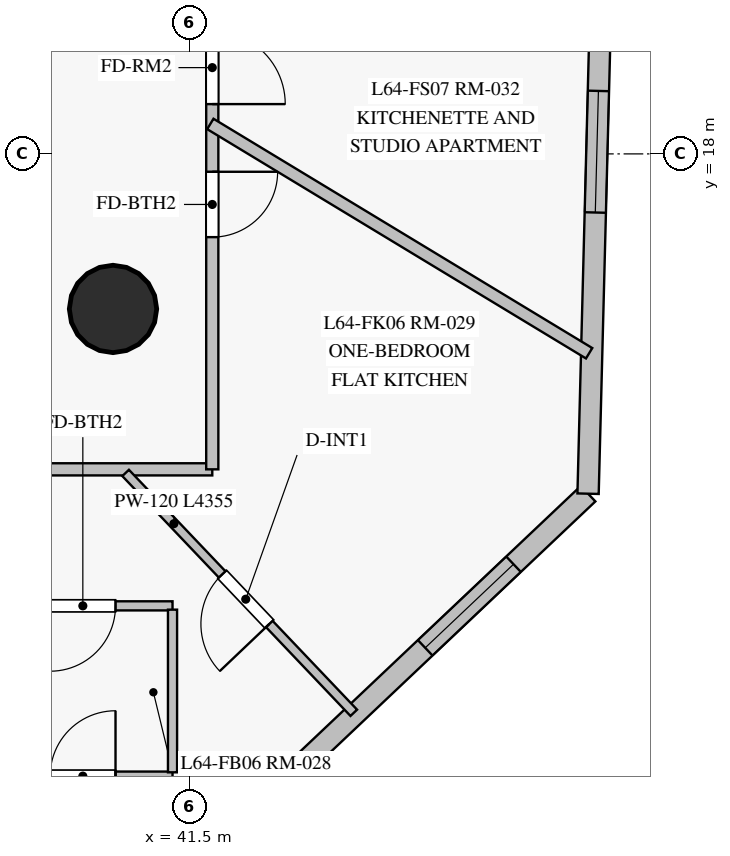
"""IFC4 building model, lengths in metres.
Left out: names, types, materials, properties, quantities, classifications, styles, units other than length and angle.
Written with IfcOpenShell. Run it as: python <this file> out.ifc"""

import sys

from ifc_helpers import new_model, si_unit, direction, frame, frame_2d, origin, origin_with_axes, origin_2d, place, context, subcontext, project, spatial, rectangle, circle, extrude, source, transform, mapped, element, fill, save


model = new_model("IFC4")
c1 = context("Model", 3, precision=1e-05, world=origin(), true_north=direction((0.0, 1.0)))
c2 = subcontext(c1, "Body", "Model", "MODEL_VIEW")
j1 = project(units=[si_unit("LENGTHUNIT", "METRE"), si_unit("PLANEANGLEUNIT", "RADIAN")], contexts=[c1])
p1 = place(None, origin())
s1 = spatial("IfcSite", under=j1, at=p1, CompositionType="ELEMENT")
p2 = place(p1, origin())
s2 = spatial("IfcBuilding", under=s1, at=p2, CompositionType="ELEMENT")
p3 = place(p2, frame((0.0, 0.0, 219.95)))
s3 = spatial("IfcBuildingStorey", under=s2, at=p3, CompositionType="ELEMENT", Elevation=219.95)
m1 = source(origin_with_axes(), c2, "Body", "SweptSolid", [
    extrude(circle(Radius=0.575, at=origin_2d()), origin(), (0.0, 0.0, 1.0), 3.05),
])
p4 = place(p3, frame((40.494, 15.96, 0.0), z_axis=(0.0, 0.0, 1.0), x_axis=(1.0, 0.0, 0.0)))
e1 = element("IfcColumn", 1, at=p4, inside=s3, PredefinedType="COLUMN", context=c2, shape_type="MappedRepresentation", body=[
    mapped(m1, transform((0.0, 0.0, 0.0), scale=1.0)),
])
p5 = place(p3, frame((39.758, 6.918, 0.0), z_axis=(0.0, 0.0, 1.0), x_axis=(0.726306750321, 0.687370718345, 0.0)))
e2 = element("IfcWall", 2, at=p5, inside=s3, PredefinedType="SOLIDWALL", context=c2, shape_type="SweptSolid", body=[
    extrude(rectangle(XDim=9.619, YDim=0.28, at=frame_2d((4.809, 0.0))), origin(), (0.0, 0.0, 1.0), 2.85),
])
p6 = place(p5, frame((1.939, 0.0, 0.85)))
e3 = element("IfcOpeningElement", 3, at=p6, cuts=e2, PredefinedType="OPENING", context=c2, shape_type="SweptSolid", body=[
    extrude(rectangle(XDim=1.6, YDim=1.6, at=frame_2d((0.8, 0.8))), frame((0.0, 0.15, 0.0), z_axis=(0.0, -1.0, 0.0), x_axis=(1.0, 0.0, 0.0)), (0.0, 0.0, 1.0), 0.3),
])
p7 = place(p5, frame((6.669, 0.0, 0.85)))
e4 = element("IfcOpeningElement", 4, at=p7, cuts=e2, PredefinedType="OPENING", context=c2, shape_type="SweptSolid", body=[
    extrude(rectangle(XDim=1.6, YDim=1.6, at=frame_2d((0.8, 0.8))), frame((0.0, 0.15, 0.0), z_axis=(0.0, -1.0, 0.0), x_axis=(1.0, 0.0, 0.0)), (0.0, 0.0, 1.0), 0.3),
])
p8 = place(p3, frame((46.744, 13.53, 0.0), z_axis=(0.0, 0.0, 1.0), x_axis=(0.025686260169, 0.999670053587, 0.0)))
e5 = element("IfcWall", 5, at=p8, inside=s3, PredefinedType="SOLIDWALL", context=c2, shape_type="SweptSolid", body=[
    extrude(rectangle(XDim=12.708, YDim=0.28, at=frame_2d((6.354, 0.0))), origin(), (0.0, 0.0, 1.0), 2.85),
])
p9 = place(p8, frame((3.7, 0.0, 0.85)))
e6 = element("IfcOpeningElement", 6, at=p9, cuts=e5, PredefinedType="OPENING", context=c2, shape_type="SweptSolid", body=[
    extrude(rectangle(XDim=1.6, YDim=1.6, at=frame_2d((0.8, 0.8))), frame((0.0, 0.15, 0.0), z_axis=(0.0, -1.0, 0.0), x_axis=(1.0, 0.0, 0.0)), (0.0, 0.0, 1.0), 0.3),
])
p10 = place(p8, frame((8.332, 0.0, 0.85)))
e7 = element("IfcOpeningElement", 7, at=p10, cuts=e5, PredefinedType="OPENING", context=c2, shape_type="SweptSolid", body=[
    extrude(rectangle(XDim=1.6, YDim=1.6, at=frame_2d((0.8, 0.8))), frame((0.0, 0.15, 0.0), z_axis=(0.0, -1.0, 0.0), x_axis=(1.0, 0.0, 0.0)), (0.0, 0.0, 1.0), 0.3),
])
p11 = place(p3, frame((41.8, 13.85, 0.0), z_axis=(0.0, 0.0, 1.0), x_axis=(-1.0, 0.0, 0.0)))
e8 = element("IfcWall", 8, at=p11, inside=s3, PredefinedType="PARTITIONING", context=c2, shape_type="SweptSolid", body=[
    extrude(rectangle(XDim=25.05, YDim=0.16, at=frame_2d((12.525, 0.0))), origin(), (0.0, 0.0, 1.0), 2.3),
])
p12 = place(p11, frame((22.03, 0.0, 0.0)))
e9 = element("IfcOpeningElement", 9, at=p12, cuts=e8, PredefinedType="OPENING", context=c2, shape_type="SweptSolid", body=[
    extrude(rectangle(XDim=0.96, YDim=2.15, at=frame_2d((0.48, 1.075))), frame((0.0, 0.09, 0.0), z_axis=(0.0, -1.0, 0.0), x_axis=(1.0, 0.0, 0.0)), (0.0, 0.0, 1.0), 0.18),
])
p13 = place(p11, frame((15.808, 0.0, 0.0)))
e10 = element("IfcOpeningElement", 10, at=p13, cuts=e8, PredefinedType="OPENING", context=c2, shape_type="SweptSolid", body=[
    extrude(rectangle(XDim=0.96, YDim=2.15, at=frame_2d((0.48, 1.075))), frame((0.0, 0.09, 0.0), z_axis=(0.0, -1.0, 0.0), x_axis=(1.0, 0.0, 0.0)), (0.0, 0.0, 1.0), 0.18),
])
p14 = place(p11, frame((12.05, 0.0, 0.0)))
e11 = element("IfcOpeningElement", 11, at=p14, cuts=e8, PredefinedType="OPENING", context=c2, shape_type="SweptSolid", body=[
    extrude(rectangle(XDim=0.96, YDim=2.15, at=frame_2d((0.48, 1.075))), frame((0.0, 0.09, 0.0), z_axis=(0.0, -1.0, 0.0), x_axis=(1.0, 0.0, 0.0)), (0.0, 0.0, 1.0), 0.18),
])
p15 = place(p11, frame((8.292, 0.0, 0.0)))
e12 = element("IfcOpeningElement", 12, at=p15, cuts=e8, PredefinedType="OPENING", context=c2, shape_type="SweptSolid", body=[
    extrude(rectangle(XDim=0.96, YDim=2.15, at=frame_2d((0.48, 1.075))), frame((0.0, 0.09, 0.0), z_axis=(0.0, -1.0, 0.0), x_axis=(1.0, 0.0, 0.0)), (0.0, 0.0, 1.0), 0.18),
])
p16 = place(p11, frame((3.184, 0.0, 0.0)))
e13 = element("IfcOpeningElement", 13, at=p16, cuts=e8, PredefinedType="OPENING", context=c2, shape_type="SweptSolid", body=[
    extrude(rectangle(XDim=0.86, YDim=2.04, at=frame_2d((0.43, 1.02))), frame((0.0, 0.09, 0.0), z_axis=(0.0, -1.0, 0.0), x_axis=(1.0, 0.0, 0.0)), (0.0, 0.0, 1.0), 0.18),
])
p17 = place(p3, frame((41.8, 33.45, 0.0), z_axis=(0.0, 0.0, 1.0), x_axis=(0.0, -1.0, 0.0)))
e14 = element("IfcWall", 14, at=p17, inside=s3, PredefinedType="PARTITIONING", context=c2, shape_type="SweptSolid", body=[
    extrude(rectangle(XDim=19.6, YDim=0.16, at=frame_2d((9.8, 0.0))), origin(), (0.0, 0.0, 1.0), 2.3),
])
p18 = place(p17, frame((13.835, 0.0, 0.0)))
e15 = element("IfcOpeningElement", 15, at=p18, cuts=e14, PredefinedType="OPENING", context=c2, shape_type="SweptSolid", body=[
    extrude(rectangle(XDim=0.96, YDim=2.15, at=frame_2d((0.48, 1.075))), frame((0.0, 0.09, 0.0), z_axis=(0.0, -1.0, 0.0), x_axis=(1.0, 0.0, 0.0)), (0.0, 0.0, 1.0), 0.18),
])
p19 = place(p17, frame((10.934, 0.0, 0.0)))
e16 = element("IfcOpeningElement", 16, at=p19, cuts=e14, PredefinedType="OPENING", context=c2, shape_type="SweptSolid", body=[
    extrude(rectangle(XDim=0.96, YDim=2.15, at=frame_2d((0.48, 1.075))), frame((0.0, 0.09, 0.0), z_axis=(0.0, -1.0, 0.0), x_axis=(1.0, 0.0, 0.0)), (0.0, 0.0, 1.0), 0.18),
])
p20 = place(p17, frame((3.701, 0.0, 0.0)))
e17 = element("IfcOpeningElement", 17, at=p20, cuts=e14, PredefinedType="OPENING", context=c2, shape_type="SweptSolid", body=[
    extrude(rectangle(XDim=0.96, YDim=2.15, at=frame_2d((0.48, 1.075))), frame((0.0, 0.09, 0.0), z_axis=(0.0, -1.0, 0.0), x_axis=(1.0, 0.0, 0.0)), (0.0, 0.0, 1.0), 0.18),
])
p21 = place(p17, frame((15.685, 0.0, 0.0)))
e18 = element("IfcOpeningElement", 18, at=p21, cuts=e14, PredefinedType="OPENING", context=c2, shape_type="SweptSolid", body=[
    extrude(rectangle(XDim=0.86, YDim=2.04, at=frame_2d((0.43, 1.02))), frame((0.0, 0.09, 0.0), z_axis=(0.0, -1.0, 0.0), x_axis=(1.0, 0.0, 0.0)), (0.0, 0.0, 1.0), 0.18),
])
p22 = place(p3, frame((35.659, 13.876, 0.0), z_axis=(0.0, 0.0, 1.0), x_axis=(0.496904293202, -0.867805348795, 0.0)))
e19 = element("IfcWall", 19, at=p22, inside=s3, PredefinedType="PARTITIONING", context=c2, shape_type="SweptSolid", body=[
    extrude(rectangle(XDim=8.002, YDim=0.16, at=frame_2d((4.001, 0.0))), origin(), (0.0, 0.0, 1.0), 2.85),
])
p23 = place(p3, frame((41.774, 18.394, 0.0), z_axis=(0.0, 0.0, 1.0), x_axis=(0.855456106039, -0.517875323453, 0.0)))
e20 = element("IfcWall", 20, at=p23, inside=s3, PredefinedType="PARTITIONING", context=c2, shape_type="SweptSolid", body=[
    extrude(rectangle(XDim=5.825, YDim=0.16, at=frame_2d((2.913, 0.0))), origin(), (0.0, 0.0, 1.0), 2.85),
])
p24 = place(p3, frame((43.662, 10.647, 0.0), z_axis=(0.0, 0.0, 1.0), x_axis=(-0.689200128432, 0.724571033763, 0.0)))
e21 = element("IfcWall", 21, at=p24, inside=s3, PredefinedType="PARTITIONING", context=c2, shape_type="SweptSolid", body=[
    extrude(rectangle(XDim=4.355, YDim=0.12, at=frame_2d((2.178, 0.0))), origin(), (0.0, 0.0, 1.0), 2.85),
])
p25 = place(p24, frame((1.613, 0.0, 0.0)))
e22 = element("IfcOpeningElement", 22, at=p25, cuts=e21, PredefinedType="OPENING", context=c2, shape_type="SweptSolid", body=[
    extrude(rectangle(XDim=0.9, YDim=2.1, at=frame_2d((0.45, 1.05))), frame((0.0, 0.07, 0.0), z_axis=(0.0, -1.0, 0.0), x_axis=(1.0, 0.0, 0.0)), (0.0, 0.0, 1.0), 0.14),
])
p26 = place(p3, frame((38.917, 9.814, 0.0), z_axis=(0.0, 0.0, 1.0), x_axis=(1.0, 0.0, 0.0)))
e23 = element("IfcWall", 23, at=p26, inside=s3, PredefinedType="PARTITIONING", context=c2, shape_type="SweptSolid", body=[
    extrude(rectangle(XDim=2.36, YDim=0.12, at=frame_2d((1.18, 0.0))), origin(), (0.0, 0.0, 1.0), 2.85),
])
p27 = place(p26, frame((0.75, 0.0, 0.0)))
e24 = element("IfcOpeningElement", 24, at=p27, cuts=e23, PredefinedType="OPENING", context=c2, shape_type="SweptSolid", body=[
    extrude(rectangle(XDim=0.86, YDim=2.1, at=frame_2d((0.43, 1.05))), frame((0.0, 0.07, 0.0), z_axis=(0.0, -1.0, 0.0), x_axis=(1.0, 0.0, 0.0)), (0.0, 0.0, 1.0), 0.14),
])
p28 = place(p3, frame((41.277, 12.054, 0.0), z_axis=(0.0, 0.0, 1.0), x_axis=(-1.0, 0.0, 0.0)))
e25 = element("IfcWall", 25, at=p28, inside=s3, PredefinedType="PARTITIONING", context=c2, shape_type="SweptSolid", body=[
    extrude(rectangle(XDim=2.36, YDim=0.12, at=frame_2d((1.18, 0.0))), origin(), (0.0, 0.0, 1.0), 2.85),
])
p29 = place(p28, frame((0.75, 0.0, 0.0)))
e26 = element("IfcOpeningElement", 26, at=p29, cuts=e25, PredefinedType="OPENING", context=c2, shape_type="SweptSolid", body=[
    extrude(rectangle(XDim=0.86, YDim=2.04, at=frame_2d((0.43, 1.02))), frame((0.0, 0.07, 0.0), z_axis=(0.0, -1.0, 0.0), x_axis=(1.0, 0.0, 0.0)), (0.0, 0.0, 1.0), 0.14),
])
p30 = place(p3, frame((41.277, 9.864, 0.0), z_axis=(0.0, 0.0, 1.0), x_axis=(0.0, 1.0, 0.0)))
e27 = element("IfcWall", 27, at=p30, inside=s3, PredefinedType="PARTITIONING", context=c2, shape_type="SweptSolid", body=[
    extrude(rectangle(XDim=2.14, YDim=0.12, at=frame_2d((1.07, 0.0))), origin(), (0.0, 0.0, 1.0), 2.85),
])
m2 = source(origin_with_axes(), c2, "Body", "SweptSolid", [
    extrude(rectangle(XDim=1.6, YDim=1.6, at=frame_2d((0.8, 0.8))), frame((0.0, 0.03, 0.0), z_axis=(0.0, -1.0, 0.0), x_axis=(1.0, 0.0, 0.0)), (0.0, 0.0, 1.0), 0.06),
])
p31 = place(p7, origin())
e28 = element("IfcWindow", 28, at=p31, inside=s3, PartitioningType="SINGLE_PANEL", PredefinedType="WINDOW", context=c2, shape_type="MappedRepresentation", body=[
    mapped(m2, transform((0.0, 0.0, 0.0), scale=1.0)),
])
fill(e4, e28)
p32 = place(p9, origin())
e29 = element("IfcWindow", 29, at=p32, inside=s3, PartitioningType="SINGLE_PANEL", PredefinedType="WINDOW", context=c2, shape_type="MappedRepresentation", body=[
    mapped(m2, transform((0.0, 0.0, 0.0), scale=1.0)),
])
fill(e6, e29)
m3 = source(origin_with_axes(), c2, "Body", "SweptSolid", [
    extrude(rectangle(XDim=0.86, YDim=2.1, at=frame_2d((0.43, 1.05))), frame((0.0, 0.025, 0.0), z_axis=(0.0, -1.0, 0.0), x_axis=(1.0, 0.0, 0.0)), (0.0, 0.0, 1.0), 0.05),
])
p33 = place(p27, origin())
e30 = element("IfcDoor", 30, at=p33, inside=s3, OperationType="SINGLE_SWING_RIGHT", PredefinedType="DOOR", context=c2, shape_type="MappedRepresentation", body=[
    mapped(m3, transform((0.0, 0.0, 0.0), scale=1.0)),
])
fill(e24, e30)
m4 = source(origin_with_axes(), c2, "Body", "SweptSolid", [
    extrude(rectangle(XDim=0.9, YDim=2.1, at=frame_2d((0.45, 1.05))), frame((0.0, 0.025, 0.0), z_axis=(0.0, -1.0, 0.0), x_axis=(1.0, 0.0, 0.0)), (0.0, 0.0, 1.0), 0.05),
])
p34 = place(p25, origin())
e31 = element("IfcDoor", 31, at=p34, inside=s3, OperationType="SINGLE_SWING_LEFT", PredefinedType="DOOR", context=c2, shape_type="MappedRepresentation", body=[
    mapped(m4, transform((0.0, 0.0, 0.0), scale=1.0)),
])
fill(e22, e31)
m5 = source(origin_with_axes(), c2, "Body", "SweptSolid", [
    extrude(rectangle(XDim=0.96, YDim=2.15, at=frame_2d((0.48, 1.075))), frame((0.0, 0.025, 0.0), z_axis=(0.0, -1.0, 0.0), x_axis=(1.0, 0.0, 0.0)), (0.0, 0.0, 1.0), 0.05),
])
p35 = place(p18, origin())
e32 = element("IfcDoor", 32, at=p35, inside=s3, OperationType="SINGLE_SWING_RIGHT", PredefinedType="DOOR", context=c2, shape_type="MappedRepresentation", body=[
    mapped(m5, transform((0.0, 0.0, 0.0), scale=1.0)),
])
fill(e15, e32)
m6 = source(origin_with_axes(), c2, "Body", "SweptSolid", [
    extrude(rectangle(XDim=0.86, YDim=2.04, at=frame_2d((0.43, 1.02))), frame((0.0, 0.025, 0.0), z_axis=(0.0, -1.0, 0.0), x_axis=(1.0, 0.0, 0.0)), (0.0, 0.0, 1.0), 0.05),
])
p36 = place(p29, origin())
e33 = element("IfcDoor", 33, at=p36, inside=s3, OperationType="SINGLE_SWING_RIGHT", PredefinedType="DOOR", context=c2, shape_type="MappedRepresentation", body=[
    mapped(m6, transform((0.0, 0.0, 0.0), scale=1.0)),
])
fill(e26, e33)
p37 = place(p21, origin())
e34 = element("IfcDoor", 34, at=p37, inside=s3, OperationType="SINGLE_SWING_LEFT", PredefinedType="DOOR", context=c2, shape_type="MappedRepresentation", body=[
    mapped(m6, transform((0.0, 0.0, 0.0), scale=1.0)),
])
fill(e18, e34)
save(model, sys.argv[1])
